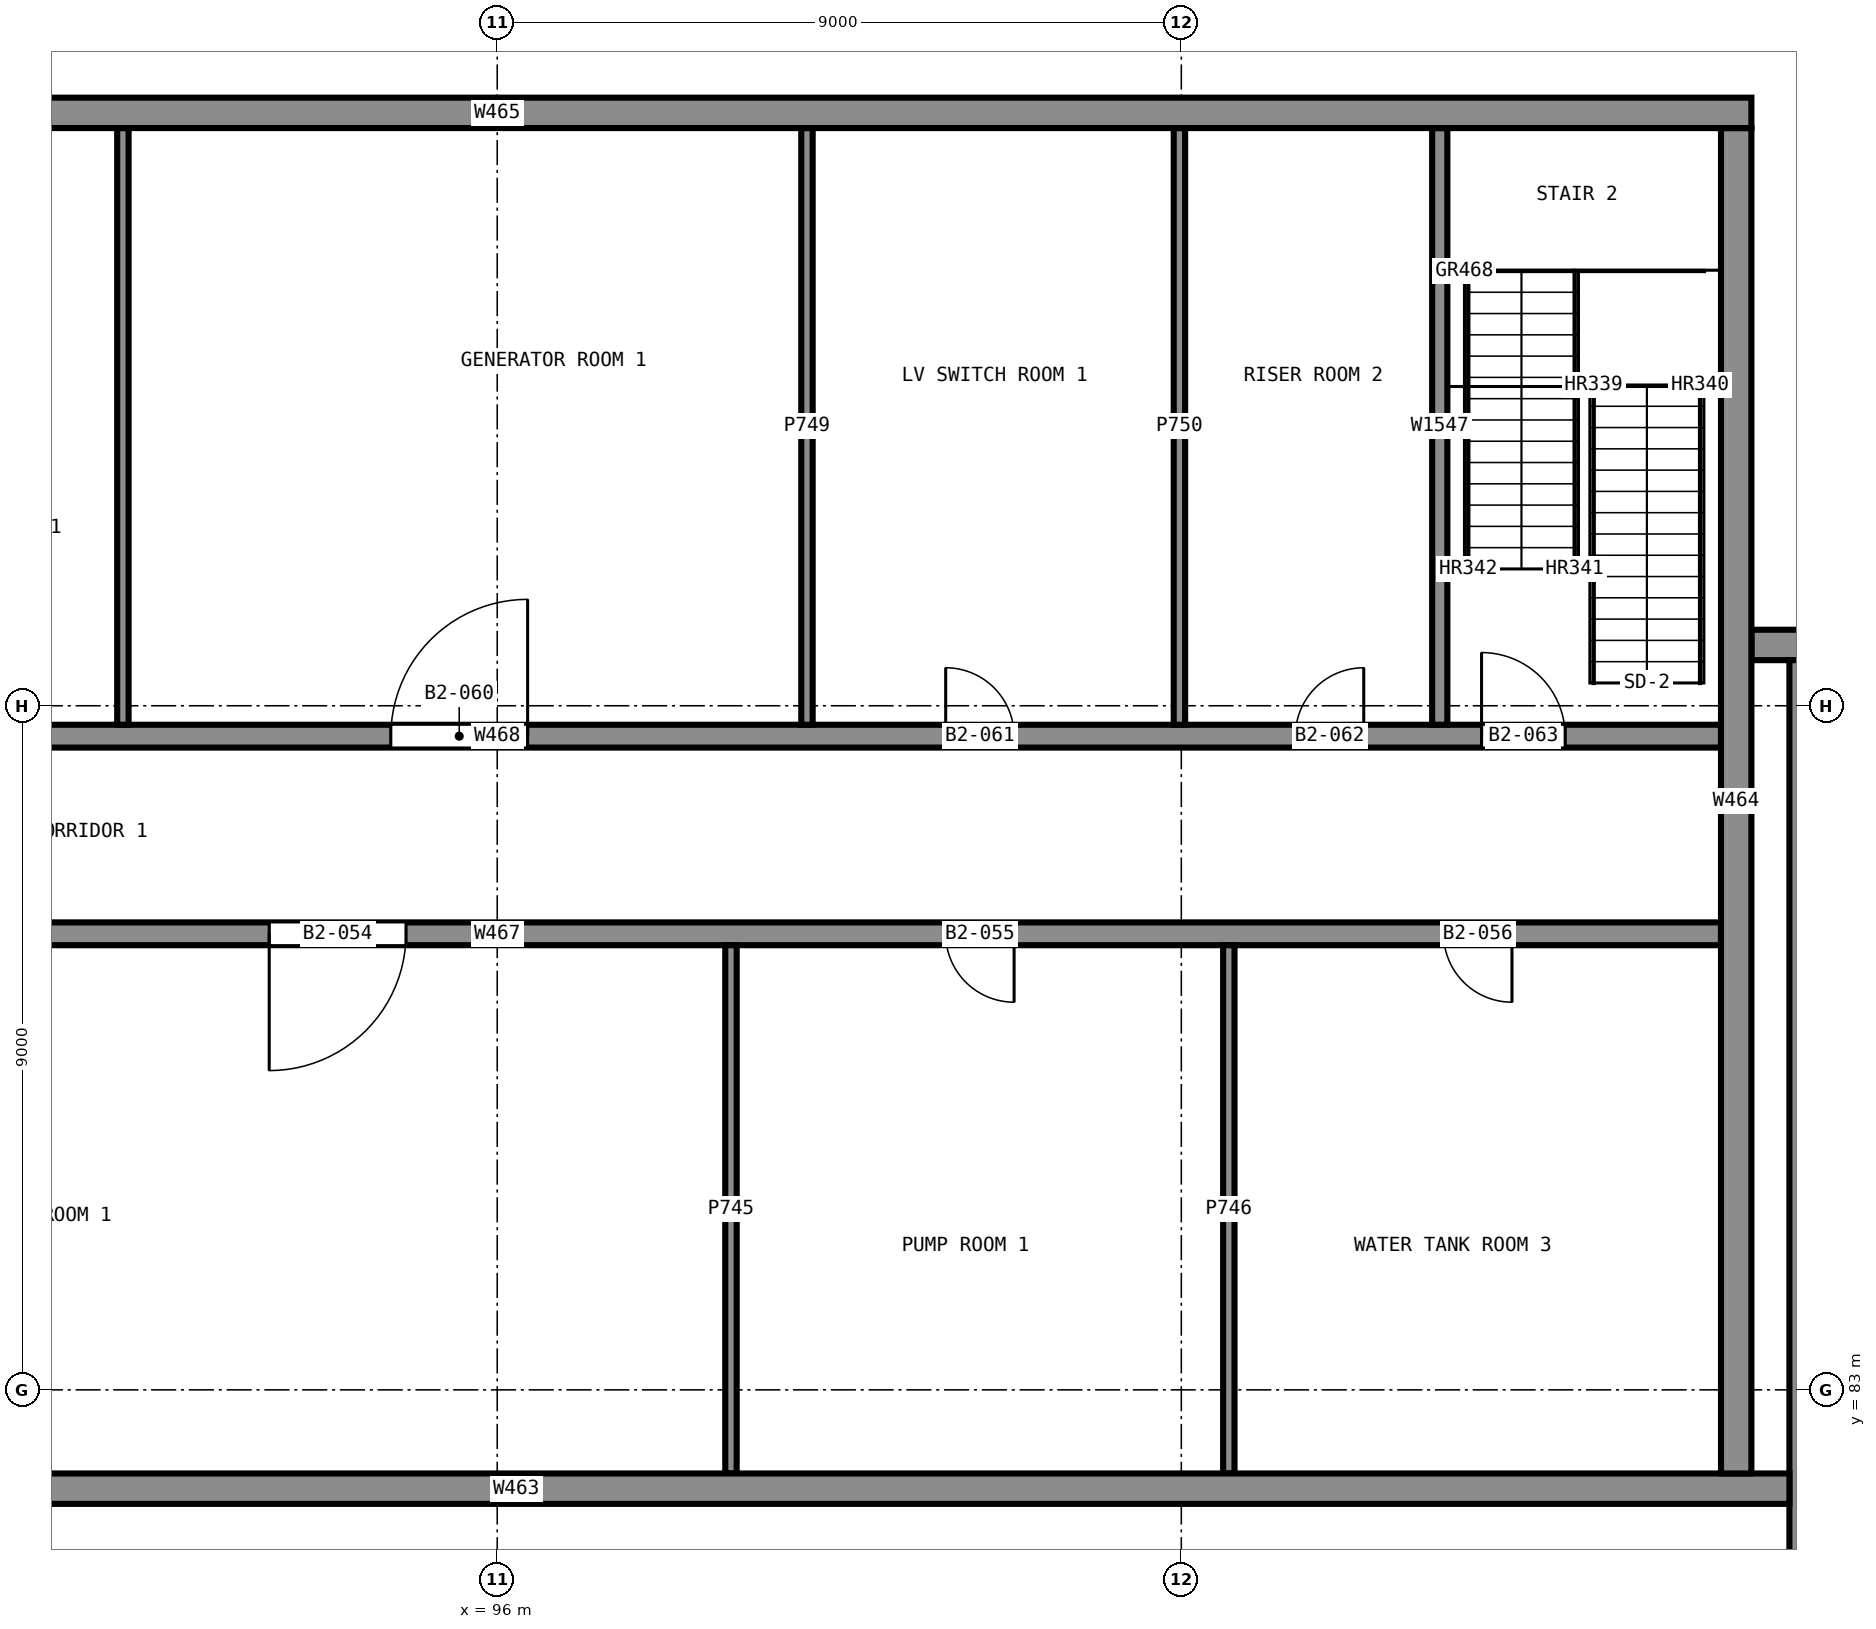
"""IFC4 building model, lengths in metres.
Left out: names, types, materials, properties, quantities, classifications, styles, units other than length and angle.
Written with IfcOpenShell. Run it as: python <this file> out.ifc"""

import sys

from ifc_helpers import new_model, si_unit, direction, frame, frame_2d, origin, place, context, subcontext, project, spatial, rectangle, extrude, element, fill, save


model = new_model("IFC4")
c1 = context("Model", 3, precision=1e-05, world=origin(), true_north=direction((0.0, 1.0)))
c2 = subcontext(c1, "Body", "Model", "MODEL_VIEW")
j1 = project(units=[si_unit("LENGTHUNIT", "METRE"), si_unit("PLANEANGLEUNIT", "RADIAN")], contexts=[c1])
p1 = place(None, origin())
s1 = spatial("IfcSite", under=j1, at=p1, CompositionType="ELEMENT")
p2 = place(p1, origin())
s2 = spatial("IfcBuilding", under=s1, at=p2, CompositionType="ELEMENT")
p3 = place(p2, frame((0.0, 0.0, -10.0)))
s3 = spatial("IfcBuildingStorey", under=s2, at=p3, CompositionType="ELEMENT", Elevation=-10.0)
p4 = place(p3, frame((151.0, 92.8, 0.0), z_axis=(0.0, 0.0, 1.0), x_axis=(-1.0, 0.0, 0.0)))
e1 = element("IfcWall", 1, at=p4, inside=s3, PredefinedType="SOLIDWALL", context=c2, shape_type="SweptSolid", body=[
    extrude(rectangle(XDim=38.5, YDim=0.4, at=frame_2d((19.25, 0.0))), origin(), (0.0, 0.0, 1.0), 4.7),
])
p5 = place(p3, frame((113.2, 92.6, 0.0), z_axis=(0.0, 0.0, 1.0), x_axis=(0.0, -1.0, 0.0)))
e2 = element("IfcWall", 2, at=p5, inside=s3, PredefinedType="SOLIDWALL", context=c2, shape_type="SweptSolid", body=[
    extrude(rectangle(XDim=37.2, YDim=0.4, at=frame_2d((18.6, 0.0))), origin(), (0.0, 0.0, 1.0), 4.7),
])
p6 = place(p3, frame((79.5, 81.7, 0.0), z_axis=(0.0, 0.0, 1.0), x_axis=(1.0, 0.0, 0.0)))
e3 = element("IfcWall", 3, at=p6, inside=s3, PredefinedType="SOLIDWALL", context=c2, shape_type="SweptSolid", body=[
    extrude(rectangle(XDim=33.5, YDim=0.4, at=frame_2d((16.75, 0.0))), origin(), (0.0, 0.0, 1.0), 4.7),
])
p7 = place(p3, frame((112.3, 81.9, 0.0), z_axis=(0.0, 0.0, 1.0), x_axis=(0.0, 1.0, 0.0)))
e4 = element("IfcWall", 4, at=p7, inside=s3, PredefinedType="SOLIDWALL", context=c2, shape_type="SweptSolid", body=[
    extrude(rectangle(XDim=17.7, YDim=0.4, at=frame_2d((8.85, 0.0))), origin(), (0.0, 0.0, 1.0), 4.7),
])
p8 = place(p3, frame((112.5, 99.8, 0.0), z_axis=(0.0, 0.0, 1.0), x_axis=(-1.0, 0.0, 0.0)))
e5 = element("IfcWall", 5, at=p8, inside=s3, PredefinedType="SOLIDWALL", context=c2, shape_type="SweptSolid", body=[
    extrude(rectangle(XDim=33.0, YDim=0.4, at=frame_2d((16.5, 0.0))), origin(), (0.0, 0.0, 1.0), 4.7),
])
p9 = place(p3, frame((79.9, 89.0, 0.0), z_axis=(0.0, 0.0, 1.0), x_axis=(1.0, 0.0, 0.0)))
e6 = element("IfcWall", 6, at=p9, inside=s3, PredefinedType="SHEAR", context=c2, shape_type="SweptSolid", body=[
    extrude(rectangle(XDim=32.2, YDim=0.3, at=frame_2d((16.1, 0.0))), origin(), (0.0, 0.0, 1.0), 4.7),
])
p10 = place(p9, frame((13.1, 0.0, 0.0)))
e7 = element("IfcOpeningElement", 7, at=p10, cuts=e6, PredefinedType="OPENING", context=c2, shape_type="SweptSolid", body=[
    extrude(rectangle(XDim=1.8, YDim=2.1, at=frame_2d((0.9, 1.05))), frame((0.0, 0.16, 0.0), z_axis=(0.0, -1.0, 0.0), x_axis=(1.0, 0.0, 0.0)), (0.0, 0.0, 1.0), 0.32),
])
p11 = place(p9, frame((22.0, 0.0, 0.0)))
e8 = element("IfcOpeningElement", 8, at=p11, cuts=e6, PredefinedType="OPENING", context=c2, shape_type="SweptSolid", body=[
    extrude(rectangle(XDim=0.9, YDim=2.1, at=frame_2d((0.45, 1.05))), frame((0.0, 0.16, 0.0), z_axis=(0.0, -1.0, 0.0), x_axis=(1.0, 0.0, 0.0)), (0.0, 0.0, 1.0), 0.32),
])
p12 = place(p9, frame((28.55, 0.0, 0.0)))
e9 = element("IfcOpeningElement", 9, at=p12, cuts=e6, PredefinedType="OPENING", context=c2, shape_type="SweptSolid", body=[
    extrude(rectangle(XDim=0.9, YDim=2.1, at=frame_2d((0.45, 1.05))), frame((0.0, 0.16, 0.0), z_axis=(0.0, -1.0, 0.0), x_axis=(1.0, 0.0, 0.0)), (0.0, 0.0, 1.0), 0.32),
])
p13 = place(p3, frame((79.9, 91.6, 0.0), z_axis=(0.0, 0.0, 1.0), x_axis=(1.0, 0.0, 0.0)))
e10 = element("IfcWall", 10, at=p13, inside=s3, PredefinedType="SHEAR", context=c2, shape_type="SweptSolid", body=[
    extrude(rectangle(XDim=32.2, YDim=0.3, at=frame_2d((16.1, 0.0))), origin(), (0.0, 0.0, 1.0), 4.7),
])
p14 = place(p13, frame((0.55, 0.0, 0.0)))
e11 = element("IfcOpeningElement", 11, at=p14, cuts=e10, PredefinedType="OPENING", context=c2, shape_type="SweptSolid", body=[
    extrude(rectangle(XDim=1.1, YDim=2.1, at=frame_2d((0.55, 1.05))), frame((0.0, 0.16, 0.0), z_axis=(0.0, -1.0, 0.0), x_axis=(1.0, 0.0, 0.0)), (0.0, 0.0, 1.0), 0.32),
])
p15 = place(p13, frame((4.6, 0.0, 0.0)))
e12 = element("IfcOpeningElement", 12, at=p15, cuts=e10, PredefinedType="OPENING", context=c2, shape_type="SweptSolid", body=[
    extrude(rectangle(XDim=0.9, YDim=2.1, at=frame_2d((0.45, 1.05))), frame((0.0, 0.16, 0.0), z_axis=(0.0, -1.0, 0.0), x_axis=(1.0, 0.0, 0.0)), (0.0, 0.0, 1.0), 0.32),
])
p16 = place(p13, frame((7.5, 0.0, 0.0)))
e13 = element("IfcOpeningElement", 13, at=p16, cuts=e10, PredefinedType="OPENING", context=c2, shape_type="SweptSolid", body=[
    extrude(rectangle(XDim=1.2, YDim=2.1, at=frame_2d((0.6, 1.05))), frame((0.0, 0.16, 0.0), z_axis=(0.0, -1.0, 0.0), x_axis=(1.0, 0.0, 0.0)), (0.0, 0.0, 1.0), 0.32),
])
p17 = place(p13, frame((14.7, 0.0, 0.0)))
e14 = element("IfcOpeningElement", 14, at=p17, cuts=e10, PredefinedType="OPENING", context=c2, shape_type="SweptSolid", body=[
    extrude(rectangle(XDim=1.8, YDim=2.1, at=frame_2d((0.9, 1.05))), frame((0.0, 0.16, 0.0), z_axis=(0.0, -1.0, 0.0), x_axis=(1.0, 0.0, 0.0)), (0.0, 0.0, 1.0), 0.32),
])
p18 = place(p13, frame((22.0, 0.0, 0.0)))
e15 = element("IfcOpeningElement", 15, at=p18, cuts=e10, PredefinedType="OPENING", context=c2, shape_type="SweptSolid", body=[
    extrude(rectangle(XDim=0.9, YDim=2.1, at=frame_2d((0.45, 1.05))), frame((0.0, 0.16, 0.0), z_axis=(0.0, -1.0, 0.0), x_axis=(1.0, 0.0, 0.0)), (0.0, 0.0, 1.0), 0.32),
])
p19 = place(p13, frame((26.6, 0.0, 0.0)))
e16 = element("IfcOpeningElement", 16, at=p19, cuts=e10, PredefinedType="OPENING", context=c2, shape_type="SweptSolid", body=[
    extrude(rectangle(XDim=0.9, YDim=2.1, at=frame_2d((0.45, 1.05))), frame((0.0, 0.16, 0.0), z_axis=(0.0, -1.0, 0.0), x_axis=(1.0, 0.0, 0.0)), (0.0, 0.0, 1.0), 0.32),
])
p20 = place(p13, frame((29.05, 0.0, 0.0)))
e17 = element("IfcOpeningElement", 17, at=p20, cuts=e10, PredefinedType="OPENING", context=c2, shape_type="SweptSolid", body=[
    extrude(rectangle(XDim=1.1, YDim=2.1, at=frame_2d((0.55, 1.05))), frame((0.0, 0.16, 0.0), z_axis=(0.0, -1.0, 0.0), x_axis=(1.0, 0.0, 0.0)), (0.0, 0.0, 1.0), 0.32),
])
for number, where, z_axis, x_axis in (
    (18, (99.075, 81.9, 0.0), (0.0, 0.0, 1.0), (0.0, 1.0, 0.0)),
    (19, (105.625, 81.9, 0.0), (0.0, 0.0, 1.0), (0.0, 1.0, 0.0)),
):
    element("IfcWall", number, at=place(p3, frame(where, z_axis=z_axis, x_axis=x_axis)), inside=s3, PredefinedType="PARTITIONING", context=c2, shape_type="SweptSolid", body=[
        extrude(rectangle(XDim=6.95, YDim=0.15, at=frame_2d((3.475, 0.0))), origin(), (0.0, 0.0, 1.0), 4.7),
    ])
for number, where, z_axis, x_axis in (
    (20, (91.075, 91.75, 0.0), (0.0, 0.0, 1.0), (0.0, 1.0, 0.0)),
    (21, (100.075, 91.75, 0.0), (0.0, 0.0, 1.0), (0.0, 1.0, 0.0)),
    (22, (104.975, 91.75, 0.0), (0.0, 0.0, 1.0), (0.0, 1.0, 0.0)),
):
    element("IfcWall", number, at=place(p3, frame(where, z_axis=z_axis, x_axis=x_axis)), inside=s3, PredefinedType="PARTITIONING", context=c2, shape_type="SweptSolid", body=[
        extrude(rectangle(XDim=7.85, YDim=0.15, at=frame_2d((3.925, 0.0))), origin(), (0.0, 0.0, 1.0), 4.7),
    ])
p21 = place(p3, frame((108.4, 91.75, 0.0), z_axis=(0.0, 0.0, 1.0), x_axis=(0.0, 1.0, 0.0)))
e23 = element("IfcWall", 23, at=p21, inside=s3, PredefinedType="SOLIDWALL", context=c2, shape_type="SweptSolid", body=[
    extrude(rectangle(XDim=7.85, YDim=0.2, at=frame_2d((3.925, 0.0))), origin(), (0.0, 0.0, 1.0), 4.7),
])
p22 = place(p10, frame((1.8, 0.0, 0.0), z_axis=(0.0, 0.0, 1.0), x_axis=(-1.0, 0.0, 0.0)))
e24 = element("IfcDoor", 24, at=p22, inside=s3, OperationType="DOUBLE_DOOR_SINGLE_SWING", PredefinedType="DOOR", context=c2, shape_type="SweptSolid", body=[
    extrude(rectangle(XDim=1.8, YDim=2.1, at=frame_2d((0.9, 1.05))), frame((0.0, 0.025, 0.0), z_axis=(0.0, -1.0, 0.0), x_axis=(1.0, 0.0, 0.0)), (0.0, 0.0, 1.0), 0.05),
])
fill(e7, e24)
p23 = place(p11, frame((0.9, 0.0, 0.0), z_axis=(0.0, 0.0, 1.0), x_axis=(-1.0, 0.0, 0.0)))
e25 = element("IfcDoor", 25, at=p23, inside=s3, OperationType="SINGLE_SWING_RIGHT", PredefinedType="DOOR", context=c2, shape_type="SweptSolid", body=[
    extrude(rectangle(XDim=0.9, YDim=2.1, at=frame_2d((0.45, 1.05))), frame((0.0, 0.025, 0.0), z_axis=(0.0, -1.0, 0.0), x_axis=(1.0, 0.0, 0.0)), (0.0, 0.0, 1.0), 0.05),
])
fill(e8, e25)
p24 = place(p12, frame((0.9, 0.0, 0.0), z_axis=(0.0, 0.0, 1.0), x_axis=(-1.0, 0.0, 0.0)))
e26 = element("IfcDoor", 26, at=p24, inside=s3, OperationType="SINGLE_SWING_RIGHT", PredefinedType="DOOR", context=c2, shape_type="SweptSolid", body=[
    extrude(rectangle(XDim=0.9, YDim=2.1, at=frame_2d((0.45, 1.05))), frame((0.0, 0.025, 0.0), z_axis=(0.0, -1.0, 0.0), x_axis=(1.0, 0.0, 0.0)), (0.0, 0.0, 1.0), 0.05),
])
fill(e9, e26)
p25 = place(p17, origin())
e27 = element("IfcDoor", 27, at=p25, inside=s3, OperationType="DOUBLE_DOOR_SINGLE_SWING", PredefinedType="DOOR", context=c2, shape_type="SweptSolid", body=[
    extrude(rectangle(XDim=1.8, YDim=2.1, at=frame_2d((0.9, 1.05))), frame((0.0, 0.025, 0.0), z_axis=(0.0, -1.0, 0.0), x_axis=(1.0, 0.0, 0.0)), (0.0, 0.0, 1.0), 0.05),
])
fill(e14, e27)
p26 = place(p18, origin())
e28 = element("IfcDoor", 28, at=p26, inside=s3, OperationType="SINGLE_SWING_RIGHT", PredefinedType="DOOR", context=c2, shape_type="SweptSolid", body=[
    extrude(rectangle(XDim=0.9, YDim=2.1, at=frame_2d((0.45, 1.05))), frame((0.0, 0.025, 0.0), z_axis=(0.0, -1.0, 0.0), x_axis=(1.0, 0.0, 0.0)), (0.0, 0.0, 1.0), 0.05),
])
fill(e15, e28)
p27 = place(p19, origin())
e29 = element("IfcDoor", 29, at=p27, inside=s3, OperationType="SINGLE_SWING_LEFT", PredefinedType="DOOR", context=c2, shape_type="SweptSolid", body=[
    extrude(rectangle(XDim=0.9, YDim=2.1, at=frame_2d((0.45, 1.05))), frame((0.0, 0.025, 0.0), z_axis=(0.0, -1.0, 0.0), x_axis=(1.0, 0.0, 0.0)), (0.0, 0.0, 1.0), 0.05),
])
fill(e16, e29)
p28 = place(p20, origin())
e30 = element("IfcDoor", 30, at=p28, inside=s3, OperationType="SINGLE_SWING_RIGHT", PredefinedType="DOOR", context=c2, shape_type="SweptSolid", body=[
    extrude(rectangle(XDim=1.1, YDim=2.1, at=frame_2d((0.55, 1.05))), frame((0.0, 0.025, 0.0), z_axis=(0.0, -1.0, 0.0), x_axis=(1.0, 0.0, 0.0)), (0.0, 0.0, 1.0), 0.05),
])
fill(e17, e30)
save(model, sys.argv[1])
